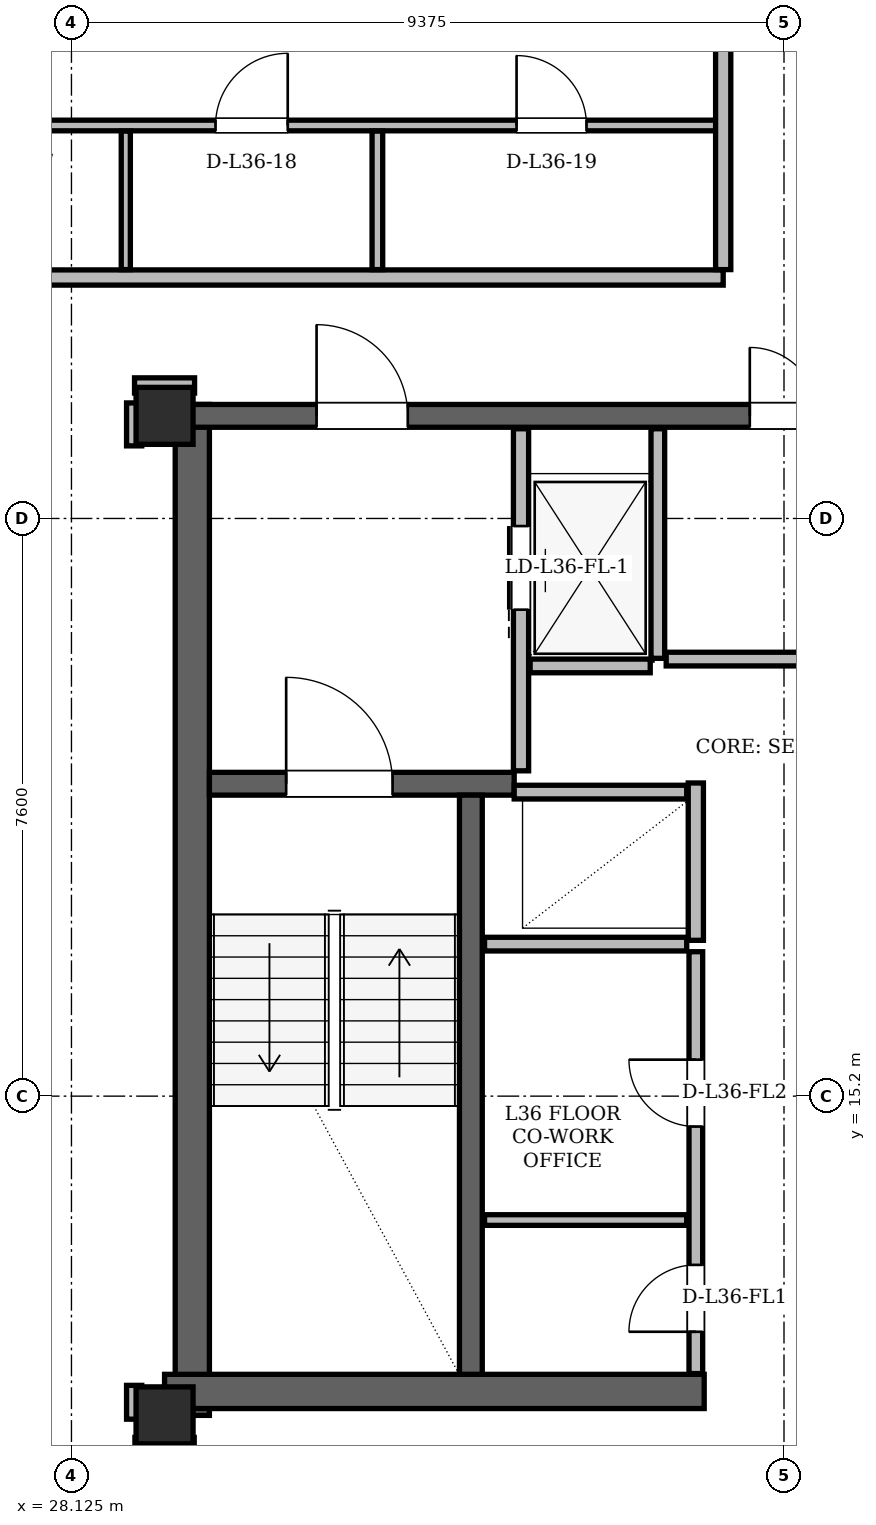
"""IFC4 building model, lengths in metres.
Left out: names, types, materials, properties, quantities, classifications, styles, units other than length and angle.
Written with IfcOpenShell. Run it as: python <this file> out.ifc"""

import sys

from ifc_helpers import new_model, si_unit, direction, frame, frame_2d, origin, origin_2d, place, context, subcontext, project, spatial, rectangle, hollow_rectangle, extrude, element, fill, save


model = new_model("IFC4")
c1 = context("Model", 3, precision=1e-05, world=origin(), true_north=direction((0.0, 1.0)))
c2 = subcontext(c1, "Body", "Model", "MODEL_VIEW")
j1 = project(units=[si_unit("LENGTHUNIT", "METRE"), si_unit("PLANEANGLEUNIT", "RADIAN")], contexts=[c1])
p1 = place(None, origin())
s1 = spatial("IfcSite", under=j1, at=p1, CompositionType="ELEMENT")
p2 = place(p1, origin())
s2 = spatial("IfcBuilding", under=s1, at=p2, CompositionType="ELEMENT")
p3 = place(p2, frame((0.0, 0.0, 138.6)))
s3 = spatial("IfcBuildingStorey", under=s2, at=p3, CompositionType="ELEMENT", Elevation=138.6)
for number, where, z_axis, x_axis in (
    (1, (29.35, 11.0, 0.0), (0.0, 0.0, 1.0), (1.0, 0.0, 0.0)),
    (2, (29.35, 24.15, 0.0), (0.0, 0.0, 1.0), (1.0, 0.0, 0.0)),
):
    element("IfcColumn", number, at=place(p3, frame(where, z_axis=z_axis, x_axis=x_axis)), inside=s3, PredefinedType="COLUMN", context=c2, shape_type="SweptSolid", body=[
        extrude(hollow_rectangle(XDim=0.75, YDim=0.75, WallThickness=0.06, at=origin_2d()), origin(), (0.0, 0.0, 1.0), 3.6),
    ])
p4 = place(p3, frame((29.715, 11.0, 0.0), z_axis=(0.0, 0.0, 1.0), x_axis=(0.0, 1.0, 0.0)))
e3 = element("IfcWall", 3, at=p4, inside=s3, PredefinedType="SHEAR", context=c2, shape_type="SweptSolid", body=[
    extrude(rectangle(XDim=13.3, YDim=0.45, at=frame_2d((6.65, 0.0))), origin(), (0.0, 0.0, 1.0), 3.36),
])
p5 = place(p3, frame((29.35, 11.315, 0.0), z_axis=(0.0, 0.0, 1.0), x_axis=(1.0, 0.0, 0.0)))
e4 = element("IfcWall", 4, at=p5, inside=s3, PredefinedType="SHEAR", context=c2, shape_type="SweptSolid", body=[
    extrude(rectangle(XDim=7.1, YDim=0.45, at=frame_2d((3.55, 0.0))), origin(), (0.0, 0.0, 1.0), 3.36),
])
p6 = place(p3, frame((29.65, 24.15, 0.0), z_axis=(0.0, 0.0, 1.0), x_axis=(1.0, 0.0, 0.0)))
e5 = element("IfcWall", 5, at=p6, inside=s3, PredefinedType="SHEAR", context=c2, shape_type="SweptSolid", body=[
    extrude(rectangle(XDim=15.7, YDim=0.3, at=frame_2d((7.85, 0.0))), origin(), (0.0, 0.0, 1.0), 3.36),
])
p7 = place(p6, frame((1.7, 0.0, 0.0)))
e6 = element("IfcOpeningElement", 6, at=p7, cuts=e5, PredefinedType="OPENING", context=c2, shape_type="SweptSolid", body=[
    extrude(rectangle(XDim=1.2, YDim=2.2, at=frame_2d((0.6, 1.1))), frame((0.0, 0.15, 0.0), z_axis=(0.0, -1.0, 0.0), x_axis=(1.0, 0.0, 0.0)), (0.0, 0.0, 1.0), 0.3),
])
p8 = place(p6, frame((12.8, 0.0, 0.0)))
e7 = element("IfcOpeningElement", 7, at=p8, cuts=e5, PredefinedType="OPENING", context=c2, shape_type="SweptSolid", body=[
    extrude(rectangle(XDim=1.2, YDim=2.2, at=frame_2d((0.6, 1.1))), frame((0.0, 0.15, 0.0), z_axis=(0.0, -1.0, 0.0), x_axis=(1.0, 0.0, 0.0)), (0.0, 0.0, 1.0), 0.3),
])
p9 = place(p6, frame((7.4, 0.0, 0.0)))
e8 = element("IfcOpeningElement", 8, at=p9, cuts=e5, PredefinedType="OPENING", context=c2, shape_type="SweptSolid", body=[
    extrude(rectangle(XDim=0.9, YDim=2.05, at=frame_2d((0.45, 1.025))), frame((0.0, 0.15, 0.0), z_axis=(0.0, -1.0, 0.0), x_axis=(1.0, 0.0, 0.0)), (0.0, 0.0, 1.0), 0.3),
])
p10 = place(p3, frame((29.94, 19.31, 0.0), z_axis=(0.0, 0.0, 1.0), x_axis=(1.0, 0.0, 0.0)))
e9 = element("IfcWall", 9, at=p10, inside=s3, PredefinedType="SHEAR", context=c2, shape_type="SweptSolid", body=[
    extrude(rectangle(XDim=4.01, YDim=0.3, at=frame_2d((2.005, 0.0))), origin(), (0.0, 0.0, 1.0), 3.36),
])
p11 = place(p10, frame((1.01, 0.0, 0.0)))
e10 = element("IfcOpeningElement", 10, at=p11, cuts=e9, PredefinedType="OPENING", context=c2, shape_type="SweptSolid", body=[
    extrude(rectangle(XDim=1.4, YDim=2.2, at=frame_2d((0.7, 1.1))), frame((0.0, 0.15, 0.0), z_axis=(0.0, -1.0, 0.0), x_axis=(1.0, 0.0, 0.0)), (0.0, 0.0, 1.0), 0.3),
])
p12 = place(p3, frame((33.38, 11.54, 0.0), z_axis=(0.0, 0.0, 1.0), x_axis=(0.0, 1.0, 0.0)))
e11 = element("IfcWall", 11, at=p12, inside=s3, PredefinedType="SHEAR", context=c2, shape_type="SweptSolid", body=[
    extrude(rectangle(XDim=7.62, YDim=0.3, at=frame_2d((3.81, 0.0))), origin(), (0.0, 0.0, 1.0), 3.36),
])
p13 = place(p3, frame((32.478, 43.36, 0.0), z_axis=(0.0, 0.0, 1.0), x_axis=(-0.499998325337, -0.86602637065, 0.0)))
e12 = element("IfcWall", 12, at=p13, inside=s3, PredefinedType="SOLIDWALL", context=c2, shape_type="SweptSolid", body=[
    extrude(rectangle(XDim=35.264, YDim=0.34, at=frame_2d((17.632, 0.0))), origin(), (0.0, 0.0, 1.0), 2.58),
])
p14 = place(p13, frame((6.579, 0.0, 0.0)))
e13 = element("IfcOpeningElement", 13, at=p14, cuts=e12, PredefinedType="OPENING", context=c2, shape_type="SweptSolid", body=[
    extrude(rectangle(XDim=1.5, YDim=2.2, at=frame_2d((0.75, 1.1))), frame((0.0, 0.17, 0.0), z_axis=(0.0, -1.0, 0.0), x_axis=(1.0, 0.0, 0.0)), (0.0, 0.0, 1.0), 0.34),
])
p15 = place(p13, frame((26.36, 0.0, 0.0)))
e14 = element("IfcOpeningElement", 14, at=p15, cuts=e12, PredefinedType="OPENING", context=c2, shape_type="SweptSolid", body=[
    extrude(rectangle(XDim=1.5, YDim=2.2, at=frame_2d((0.75, 1.1))), frame((0.0, 0.17, 0.0), z_axis=(0.0, -1.0, 0.0), x_axis=(1.0, 0.0, 0.0)), (0.0, 0.0, 1.0), 0.34),
])
p16 = place(p13, frame((22.175, 0.0, 0.85)))
e15 = element("IfcOpeningElement", 15, at=p16, cuts=e12, PredefinedType="OPENING", context=c2, shape_type="SweptSolid", body=[
    extrude(rectangle(XDim=1.2, YDim=1.48, at=frame_2d((0.6, 0.74))), frame((0.0, 0.17, 0.0), z_axis=(0.0, -1.0, 0.0), x_axis=(1.0, 0.0, 0.0)), (0.0, 0.0, 1.0), 0.34),
])
p17 = place(p13, frame((2.32, 0.0, 0.85)))
e16 = element("IfcOpeningElement", 16, at=p17, cuts=e12, PredefinedType="OPENING", context=c2, shape_type="SweptSolid", body=[
    extrude(rectangle(XDim=1.6, YDim=1.62, at=frame_2d((0.8, 0.81))), frame((0.0, 0.17, 0.0), z_axis=(0.0, -1.0, 0.0), x_axis=(1.0, 0.0, 0.0)), (0.0, 0.0, 1.0), 0.34),
])
p18 = place(p13, frame((12.967, 0.0, 0.85)))
e17 = element("IfcOpeningElement", 17, at=p18, cuts=e12, PredefinedType="OPENING", context=c2, shape_type="SweptSolid", body=[
    extrude(rectangle(XDim=3.0, YDim=1.62, at=frame_2d((1.5, 0.81))), frame((0.0, 0.17, 0.0), z_axis=(0.0, -1.0, 0.0), x_axis=(1.0, 0.0, 0.0)), (0.0, 0.0, 1.0), 0.34),
])
p19 = place(p13, frame((20.304, 0.0, 0.85)))
e18 = element("IfcOpeningElement", 18, at=p19, cuts=e12, PredefinedType="OPENING", context=c2, shape_type="SweptSolid", body=[
    extrude(rectangle(XDim=1.2, YDim=1.48, at=frame_2d((0.6, 0.74))), frame((0.0, 0.17, 0.0), z_axis=(0.0, -1.0, 0.0), x_axis=(1.0, 0.0, 0.0)), (0.0, 0.0, 1.0), 0.34),
])
p20 = place(p3, frame((34.04, 19.48, 0.0), z_axis=(0.0, 0.0, 1.0), x_axis=(0.0, 1.0, 0.0)))
e19 = element("IfcWall", 19, at=p20, inside=s3, PredefinedType="PARTITIONING", context=c2, shape_type="SweptSolid", body=[
    extrude(rectangle(XDim=4.5, YDim=0.2, at=frame_2d((2.25, 0.0))), origin(), (0.0, 0.0, 1.0), 2.4),
])
p21 = place(p20, frame((2.12, 0.0, 0.0)))
e20 = element("IfcOpeningElement", 20, at=p21, cuts=e19, PredefinedType="OPENING", context=c2, shape_type="SweptSolid", body=[
    extrude(rectangle(XDim=1.1, YDim=2.2, at=frame_2d((0.55, 1.1))), frame((0.0, 0.1, 0.0), z_axis=(0.0, -1.0, 0.0), x_axis=(1.0, 0.0, 0.0)), (0.0, 0.0, 1.0), 0.2),
])
p22 = place(p3, frame((35.84, 20.96, 0.0), z_axis=(0.0, 0.0, 1.0), x_axis=(0.0, 1.0, 0.0)))
e21 = element("IfcWall", 21, at=p22, inside=s3, PredefinedType="PARTITIONING", context=c2, shape_type="SweptSolid", body=[
    extrude(rectangle(XDim=3.02, YDim=0.18, at=frame_2d((1.51, 0.0))), origin(), (0.0, 0.0, 1.0), 2.4),
])
p23 = place(p3, frame((34.16, 20.86, 0.0), z_axis=(0.0, 0.0, 1.0), x_axis=(1.0, 0.0, 0.0)))
e22 = element("IfcWall", 22, at=p23, inside=s3, PredefinedType="PARTITIONING", context=c2, shape_type="SweptSolid", body=[
    extrude(rectangle(XDim=1.58, YDim=0.18, at=frame_2d((0.79, 0.0))), origin(), (0.0, 0.0, 1.0), 3.36),
])
p24 = place(p3, frame((36.34, 17.25, 0.0), z_axis=(0.0, 0.0, 1.0), x_axis=(0.0, 1.0, 0.0)))
e23 = element("IfcWall", 23, at=p24, inside=s3, PredefinedType="PARTITIONING", context=c2, shape_type="SweptSolid", body=[
    extrude(rectangle(XDim=2.07, YDim=0.2, at=frame_2d((1.035, 0.0))), origin(), (0.0, 0.0, 1.0), 3.36),
])
p25 = place(p3, frame((33.95, 19.2, 0.0), z_axis=(0.0, 0.0, 1.0), x_axis=(1.0, 0.0, 0.0)))
e24 = element("IfcWall", 24, at=p25, inside=s3, PredefinedType="PARTITIONING", context=c2, shape_type="SweptSolid", body=[
    extrude(rectangle(XDim=2.27, YDim=0.18, at=frame_2d((1.135, 0.0))), origin(), (0.0, 0.0, 1.0), 3.36),
])
p26 = place(p3, frame((33.56, 17.2, 0.0), z_axis=(0.0, 0.0, 1.0), x_axis=(1.0, 0.0, 0.0)))
e25 = element("IfcWall", 25, at=p26, inside=s3, PredefinedType="PARTITIONING", context=c2, shape_type="SweptSolid", body=[
    extrude(rectangle(XDim=2.66, YDim=0.18, at=frame_2d((1.33, 0.0))), origin(), (0.0, 0.0, 1.0), 3.36),
])
p27 = place(p3, frame((36.34, 11.55, 0.0), z_axis=(0.0, 0.0, 1.0), x_axis=(0.0, 1.0, 0.0)))
e26 = element("IfcWall", 26, at=p27, inside=s3, PredefinedType="PARTITIONING", context=c2, shape_type="SweptSolid", body=[
    extrude(rectangle(XDim=5.55, YDim=0.18, at=frame_2d((2.775, 0.0))), origin(), (0.0, 0.0, 1.0), 3.36),
])
p28 = place(p27, frame((0.55, 0.0, 0.0)))
e27 = element("IfcOpeningElement", 27, at=p28, cuts=e26, PredefinedType="OPENING", context=c2, shape_type="SweptSolid", body=[
    extrude(rectangle(XDim=0.88, YDim=2.08, at=frame_2d((0.44, 1.04))), frame((0.0, 0.09, 0.0), z_axis=(0.0, -1.0, 0.0), x_axis=(1.0, 0.0, 0.0)), (0.0, 0.0, 1.0), 0.18),
])
p29 = place(p27, frame((3.25, 0.0, 0.0)))
e28 = element("IfcOpeningElement", 28, at=p29, cuts=e26, PredefinedType="OPENING", context=c2, shape_type="SweptSolid", body=[
    extrude(rectangle(XDim=0.88, YDim=2.08, at=frame_2d((0.44, 1.04))), frame((0.0, 0.09, 0.0), z_axis=(0.0, -1.0, 0.0), x_axis=(1.0, 0.0, 0.0)), (0.0, 0.0, 1.0), 0.18),
])
p30 = place(p3, frame((33.56, 13.57, 0.0), z_axis=(0.0, 0.0, 1.0), x_axis=(1.0, 0.0, 0.0)))
e29 = element("IfcWall", 29, at=p30, inside=s3, PredefinedType="PARTITIONING", context=c2, shape_type="SweptSolid", body=[
    extrude(rectangle(XDim=2.66, YDim=0.14, at=frame_2d((1.33, 0.0))), origin(), (0.0, 0.0, 1.0), 3.36),
])
p31 = place(p3, frame((35.95, 20.95, 0.0), z_axis=(0.0, 0.0, 1.0), x_axis=(1.0, 0.0, 0.0)))
e30 = element("IfcWall", 30, at=p31, inside=s3, PredefinedType="PARTITIONING", context=c2, shape_type="SweptSolid", body=[
    extrude(rectangle(XDim=3.1, YDim=0.18, at=frame_2d((1.55, 0.0))), origin(), (0.0, 0.0, 1.0), 3.36),
])
p32 = place(p3, frame((28.96, 10.61, 0.0), z_axis=(0.0, 0.0, 1.0), x_axis=(1.0, 0.0, 0.0)))
e31 = element("IfcWall", 31, at=p32, inside=s3, PredefinedType="PARTITIONING", context=c2, shape_type="SweptSolid", body=[
    extrude(rectangle(XDim=0.78, YDim=0.2, at=frame_2d((0.39, 0.0))), origin(), (0.0, 0.0, 1.0), 2.4),
])
p33 = place(p3, frame((28.955, 24.55, 0.0), z_axis=(0.0, 0.0, 1.0), x_axis=(1.0, 0.0, 0.0)))
e32 = element("IfcWall", 32, at=p33, inside=s3, PredefinedType="PARTITIONING", context=c2, shape_type="SweptSolid", body=[
    extrude(rectangle(XDim=0.79, YDim=0.2, at=frame_2d((0.395, 0.0))), origin(), (0.0, 0.0, 1.0), 2.822),
])
p34 = place(p3, frame((27.55, 25.97, 0.0), z_axis=(0.0, 0.0, 1.0), x_axis=(1.0, 0.0, 0.0)))
e33 = element("IfcWall", 33, at=p34, inside=s3, PredefinedType="PARTITIONING", context=c2, shape_type="SweptSolid", body=[
    extrude(rectangle(XDim=9.15, YDim=0.2, at=frame_2d((4.575, 0.0))), origin(), (0.0, 0.0, 1.0), 2.822),
])
p35 = place(p3, frame((23.793, 27.97, 0.0), z_axis=(0.0, 0.0, 1.0), x_axis=(1.0, 0.0, 0.0)))
e34 = element("IfcWall", 34, at=p35, inside=s3, PredefinedType="PARTITIONING", context=c2, shape_type="SweptSolid", body=[
    extrude(rectangle(XDim=12.957, YDim=0.14, at=frame_2d((6.478, 0.0))), origin(), (0.0, 0.0, 1.0), 2.822),
])
p36 = place(p35, frame((0.529, 0.0, 0.0)))
e35 = element("IfcOpeningElement", 35, at=p36, cuts=e34, PredefinedType="OPENING", context=c2, shape_type="SweptSolid", body=[
    extrude(rectangle(XDim=0.88, YDim=2.08, at=frame_2d((0.44, 1.04))), frame((0.0, 0.07, 0.0), z_axis=(0.0, -1.0, 0.0), x_axis=(1.0, 0.0, 0.0)), (0.0, 0.0, 1.0), 0.14),
])
p37 = place(p35, frame((3.045, 0.0, 0.0)))
e36 = element("IfcOpeningElement", 36, at=p37, cuts=e34, PredefinedType="OPENING", context=c2, shape_type="SweptSolid", body=[
    extrude(rectangle(XDim=0.95, YDim=2.1, at=frame_2d((0.475, 1.05))), frame((0.0, 0.07, 0.0), z_axis=(0.0, -1.0, 0.0), x_axis=(1.0, 0.0, 0.0)), (0.0, 0.0, 1.0), 0.14),
])
p38 = place(p35, frame((6.227, 0.0, 0.0)))
e37 = element("IfcOpeningElement", 37, at=p38, cuts=e34, PredefinedType="OPENING", context=c2, shape_type="SweptSolid", body=[
    extrude(rectangle(XDim=0.95, YDim=2.1, at=frame_2d((0.475, 1.05))), frame((0.0, 0.07, 0.0), z_axis=(0.0, -1.0, 0.0), x_axis=(1.0, 0.0, 0.0)), (0.0, 0.0, 1.0), 0.14),
])
p39 = place(p35, frame((10.188, 0.0, 0.0)))
e38 = element("IfcOpeningElement", 38, at=p39, cuts=e34, PredefinedType="OPENING", context=c2, shape_type="SweptSolid", body=[
    extrude(rectangle(XDim=0.92, YDim=2.12, at=frame_2d((0.46, 1.06))), frame((0.0, 0.07, 0.0), z_axis=(0.0, -1.0, 0.0), x_axis=(1.0, 0.0, 0.0)), (0.0, 0.0, 1.0), 0.14),
])
p40 = place(p3, frame((28.84, 26.074, 0.0), z_axis=(0.0, 0.0, 1.0), x_axis=(0.0, 1.0, 0.0)))
e39 = element("IfcWall", 39, at=p40, inside=s3, PredefinedType="PARTITIONING", context=c2, shape_type="SweptSolid", body=[
    extrude(rectangle(XDim=1.822, YDim=0.12, at=frame_2d((0.911, 0.0))), origin(), (0.0, 0.0, 1.0), 3.36),
])
p41 = place(p3, frame((28.95, 10.95, 0.0), z_axis=(0.0, 0.0, 1.0), x_axis=(0.0, 1.0, 0.0)))
e40 = element("IfcWall", 40, at=p41, inside=s3, PredefinedType="PARTITIONING", context=c2, shape_type="SweptSolid", body=[
    extrude(rectangle(XDim=0.445, YDim=0.2, at=frame_2d((0.223, 0.0))), origin(), (0.0, 0.0, 1.0), 2.822),
])
p42 = place(p3, frame((28.95, 23.755, 0.0), z_axis=(0.0, 0.0, 1.0), x_axis=(0.0, 1.0, 0.0)))
e41 = element("IfcWall", 41, at=p42, inside=s3, PredefinedType="PARTITIONING", context=c2, shape_type="SweptSolid", body=[
    extrude(rectangle(XDim=0.565, YDim=0.2, at=frame_2d((0.283, 0.0))), origin(), (0.0, 0.0, 1.0), 3.36),
])
p43 = place(p3, frame((32.15, 26.074, 0.0), z_axis=(0.0, 0.0, 1.0), x_axis=(0.0, 1.0, 0.0)))
e42 = element("IfcWall", 42, at=p43, inside=s3, PredefinedType="PARTITIONING", context=c2, shape_type="SweptSolid", body=[
    extrude(rectangle(XDim=1.822, YDim=0.14, at=frame_2d((0.911, 0.0))), origin(), (0.0, 0.0, 1.0), 3.36),
])
p44 = place(p3, frame((36.7, 26.074, 0.0), z_axis=(0.0, 0.0, 1.0), x_axis=(0.0, 1.0, 0.0)))
e43 = element("IfcWall", 43, at=p44, inside=s3, PredefinedType="PARTITIONING", context=c2, shape_type="SweptSolid", body=[
    extrude(rectangle(XDim=17.112, YDim=0.2, at=frame_2d((8.556, 0.0))), origin(), (0.0, 0.0, 1.0), 3.36),
])
p45 = place(p44, frame((7.042, 0.0, 0.0)))
e44 = element("IfcOpeningElement", 44, at=p45, cuts=e43, PredefinedType="OPENING", context=c2, shape_type="SweptSolid", body=[
    extrude(rectangle(XDim=1.0, YDim=2.18, at=frame_2d((0.5, 1.09))), frame((0.0, 0.1, 0.0), z_axis=(0.0, -1.0, 0.0), x_axis=(1.0, 0.0, 0.0)), (0.0, 0.0, 1.0), 0.2),
])
p46 = place(p28, origin())
e45 = element("IfcDoor", 45, at=p46, inside=s3, OperationType="SINGLE_SWING_LEFT", PredefinedType="DOOR", context=c2, shape_type="SweptSolid", body=[
    extrude(rectangle(XDim=0.88, YDim=2.08, at=frame_2d((0.44, 1.04))), frame((0.0, 0.025, 0.0), z_axis=(0.0, -1.0, 0.0), x_axis=(1.0, 0.0, 0.0)), (0.0, 0.0, 1.0), 0.05),
])
fill(e27, e45)
p47 = place(p29, origin())
e46 = element("IfcDoor", 46, at=p47, inside=s3, OperationType="SINGLE_SWING_RIGHT", PredefinedType="DOOR", context=c2, shape_type="SweptSolid", body=[
    extrude(rectangle(XDim=0.88, YDim=2.08, at=frame_2d((0.44, 1.04))), frame((0.0, 0.025, 0.0), z_axis=(0.0, -1.0, 0.0), x_axis=(1.0, 0.0, 0.0)), (0.0, 0.0, 1.0), 0.05),
])
fill(e28, e46)
p48 = place(p21, origin())
e47 = element("IfcDoor", 47, at=p48, inside=s3, OperationType="SLIDING_TO_LEFT", PredefinedType="DOOR", context=c2, shape_type="SweptSolid", body=[
    extrude(rectangle(XDim=1.1, YDim=2.2, at=frame_2d((0.55, 1.1))), frame((0.0, 0.025, 0.0), z_axis=(0.0, -1.0, 0.0), x_axis=(1.0, 0.0, 0.0)), (0.0, 0.0, 1.0), 0.05),
])
fill(e20, e47)
p49 = place(p11, origin())
e48 = element("IfcDoor", 48, at=p49, inside=s3, OperationType="SINGLE_SWING_LEFT", PredefinedType="DOOR", context=c2, shape_type="SweptSolid", body=[
    extrude(rectangle(XDim=1.4, YDim=2.2, at=frame_2d((0.7, 1.1))), frame((0.0, 0.025, 0.0), z_axis=(0.0, -1.0, 0.0), x_axis=(1.0, 0.0, 0.0)), (0.0, 0.0, 1.0), 0.05),
])
fill(e10, e48)
p50 = place(p7, origin())
e49 = element("IfcDoor", 49, at=p50, inside=s3, OperationType="SINGLE_SWING_LEFT", PredefinedType="DOOR", context=c2, shape_type="SweptSolid", body=[
    extrude(rectangle(XDim=1.2, YDim=2.2, at=frame_2d((0.6, 1.1))), frame((0.0, 0.025, 0.0), z_axis=(0.0, -1.0, 0.0), x_axis=(1.0, 0.0, 0.0)), (0.0, 0.0, 1.0), 0.05),
])
fill(e6, e49)
p51 = place(p9, origin())
e50 = element("IfcDoor", 50, at=p51, inside=s3, OperationType="SINGLE_SWING_LEFT", PredefinedType="DOOR", context=c2, shape_type="SweptSolid", body=[
    extrude(rectangle(XDim=0.9, YDim=2.05, at=frame_2d((0.45, 1.025))), frame((0.0, 0.025, 0.0), z_axis=(0.0, -1.0, 0.0), x_axis=(1.0, 0.0, 0.0)), (0.0, 0.0, 1.0), 0.05),
])
fill(e8, e50)
p52 = place(p38, origin())
e51 = element("IfcDoor", 51, at=p52, inside=s3, OperationType="SINGLE_SWING_RIGHT", PredefinedType="DOOR", context=c2, shape_type="SweptSolid", body=[
    extrude(rectangle(XDim=0.95, YDim=2.1, at=frame_2d((0.475, 1.05))), frame((0.0, 0.025, 0.0), z_axis=(0.0, -1.0, 0.0), x_axis=(1.0, 0.0, 0.0)), (0.0, 0.0, 1.0), 0.05),
])
fill(e37, e51)
p53 = place(p39, origin())
e52 = element("IfcDoor", 52, at=p53, inside=s3, OperationType="SINGLE_SWING_LEFT", PredefinedType="DOOR", context=c2, shape_type="SweptSolid", body=[
    extrude(rectangle(XDim=0.92, YDim=2.12, at=frame_2d((0.46, 1.06))), frame((0.0, 0.025, 0.0), z_axis=(0.0, -1.0, 0.0), x_axis=(1.0, 0.0, 0.0)), (0.0, 0.0, 1.0), 0.05),
])
fill(e38, e52)
save(model, sys.argv[1])
